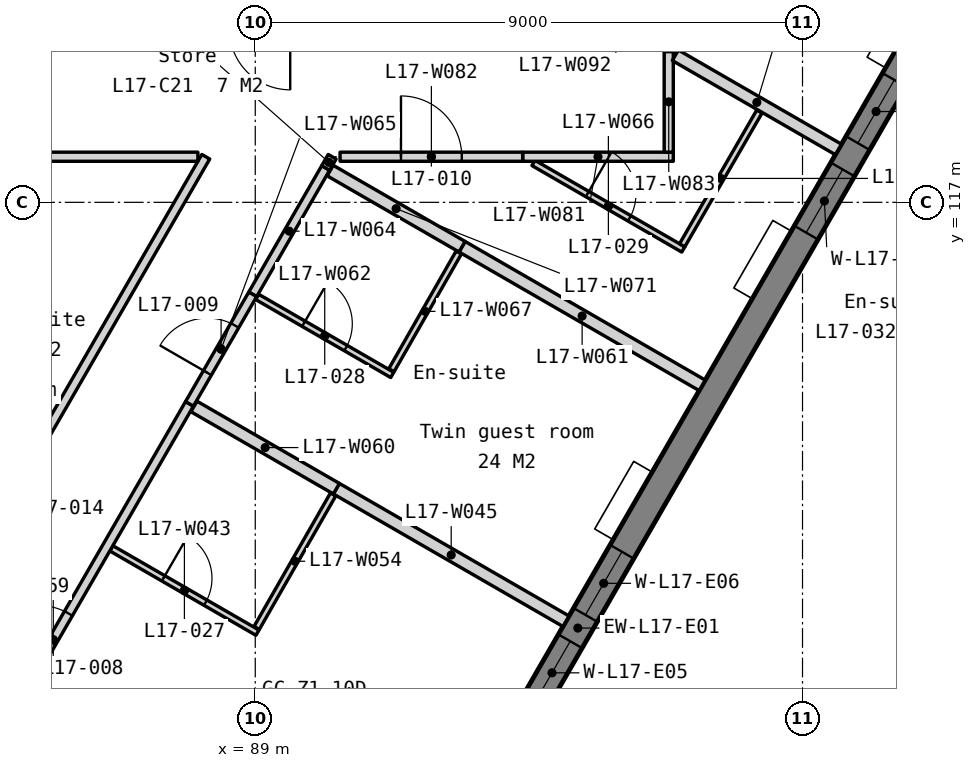
"""IFC4 building model, lengths in metres.
Left out: names, types, materials, properties, quantities, classifications, styles, units other than length and angle.
Written with IfcOpenShell. Run it as: python <this file> out.ifc"""

import sys

from ifc_helpers import new_model, si_unit, direction, frame, frame_2d, origin, place, context, subcontext, project, spatial, polyline, rectangle, outline, extrude, element, fill, save


model = new_model("IFC4")
c1 = context("Model", 3, precision=1e-05, world=origin(), true_north=direction((0.0, 1.0)))
c2 = subcontext(c1, "Body", "Model", "MODEL_VIEW")
j1 = project(units=[si_unit("LENGTHUNIT", "METRE"), si_unit("PLANEANGLEUNIT", "RADIAN")], contexts=[c1])
p1 = place(None, origin())
s1 = spatial("IfcSite", under=j1, at=p1, CompositionType="ELEMENT")
p2 = place(p1, origin())
s2 = spatial("IfcBuilding", under=s1, at=p2, CompositionType="ELEMENT")
p3 = place(p2, frame((0.0, 0.0, 73.5)))
s3 = spatial("IfcBuildingStorey", under=s2, at=p3, CompositionType="ELEMENT", Elevation=73.5)
p4 = place(p3, frame((83.105, 90.599, -0.15), z_axis=(0.0, 0.0, 1.0), x_axis=(0.499999201451, 0.866025864826, 0.0)))
e1 = element("IfcWall", 1, at=p4, inside=s3, PredefinedType="SOLIDWALL", context=c2, shape_type="SweptSolid", body=[
    extrude(outline(polyline([(44.8, 0.0), (44.8, 3.4), (0.0, 3.4), (0.0, 0.0), (44.8, 0.0)])), frame((0.0, 0.225, 0.0), z_axis=(0.0, -1.0, 0.0), x_axis=(1.0, 0.0, 0.0)), (0.0, 0.0, 1.0), 0.45),
])
p5 = place(p4, frame((3.03, 0.0, 1.05)))
e2 = element("IfcOpeningElement", 2, at=p5, cuts=e1, PredefinedType="OPENING", context=c2, shape_type="SweptSolid", body=[
    extrude(rectangle(XDim=1.2, YDim=1.5, at=frame_2d((0.6, 0.75))), frame((0.0, 0.235, 0.0), z_axis=(0.0, -1.0, 0.0), x_axis=(1.0, 0.0, 0.0)), (0.0, 0.0, 1.0), 0.47),
])
p6 = place(p4, frame((4.73, 0.0, 1.05)))
e3 = element("IfcOpeningElement", 3, at=p6, cuts=e1, PredefinedType="OPENING", context=c2, shape_type="SweptSolid", body=[
    extrude(rectangle(XDim=1.2, YDim=1.5, at=frame_2d((0.6, 0.75))), frame((0.0, 0.235, 0.0), z_axis=(0.0, -1.0, 0.0), x_axis=(1.0, 0.0, 0.0)), (0.0, 0.0, 1.0), 0.47),
])
p7 = place(p4, frame((11.99, 0.0, 1.05)))
e4 = element("IfcOpeningElement", 4, at=p7, cuts=e1, PredefinedType="OPENING", context=c2, shape_type="SweptSolid", body=[
    extrude(rectangle(XDim=1.2, YDim=1.5, at=frame_2d((0.6, 0.75))), frame((0.0, 0.235, 0.0), z_axis=(0.0, -1.0, 0.0), x_axis=(1.0, 0.0, 0.0)), (0.0, 0.0, 1.0), 0.47),
])
p8 = place(p4, frame((13.69, 0.0, 1.05)))
e5 = element("IfcOpeningElement", 5, at=p8, cuts=e1, PredefinedType="OPENING", context=c2, shape_type="SweptSolid", body=[
    extrude(rectangle(XDim=1.2, YDim=1.5, at=frame_2d((0.6, 0.75))), frame((0.0, 0.235, 0.0), z_axis=(0.0, -1.0, 0.0), x_axis=(1.0, 0.0, 0.0)), (0.0, 0.0, 1.0), 0.47),
])
p9 = place(p4, frame((20.95, 0.0, 1.05)))
e6 = element("IfcOpeningElement", 6, at=p9, cuts=e1, PredefinedType="OPENING", context=c2, shape_type="SweptSolid", body=[
    extrude(rectangle(XDim=1.2, YDim=1.5, at=frame_2d((0.6, 0.75))), frame((0.0, 0.235, 0.0), z_axis=(0.0, -1.0, 0.0), x_axis=(1.0, 0.0, 0.0)), (0.0, 0.0, 1.0), 0.47),
])
p10 = place(p4, frame((22.65, 0.0, 1.05)))
e7 = element("IfcOpeningElement", 7, at=p10, cuts=e1, PredefinedType="OPENING", context=c2, shape_type="SweptSolid", body=[
    extrude(rectangle(XDim=1.2, YDim=1.5, at=frame_2d((0.6, 0.75))), frame((0.0, 0.235, 0.0), z_axis=(0.0, -1.0, 0.0), x_axis=(1.0, 0.0, 0.0)), (0.0, 0.0, 1.0), 0.47),
])
p11 = place(p4, frame((29.91, 0.0, 1.05)))
e8 = element("IfcOpeningElement", 8, at=p11, cuts=e1, PredefinedType="OPENING", context=c2, shape_type="SweptSolid", body=[
    extrude(rectangle(XDim=1.2, YDim=1.5, at=frame_2d((0.6, 0.75))), frame((0.0, 0.235, 0.0), z_axis=(0.0, -1.0, 0.0), x_axis=(1.0, 0.0, 0.0)), (0.0, 0.0, 1.0), 0.47),
])
p12 = place(p4, frame((31.61, 0.0, 1.05)))
e9 = element("IfcOpeningElement", 9, at=p12, cuts=e1, PredefinedType="OPENING", context=c2, shape_type="SweptSolid", body=[
    extrude(rectangle(XDim=1.2, YDim=1.5, at=frame_2d((0.6, 0.75))), frame((0.0, 0.235, 0.0), z_axis=(0.0, -1.0, 0.0), x_axis=(1.0, 0.0, 0.0)), (0.0, 0.0, 1.0), 0.47),
])
p13 = place(p4, frame((38.87, 0.0, 1.05)))
e10 = element("IfcOpeningElement", 10, at=p13, cuts=e1, PredefinedType="OPENING", context=c2, shape_type="SweptSolid", body=[
    extrude(rectangle(XDim=1.2, YDim=1.5, at=frame_2d((0.6, 0.75))), frame((0.0, 0.235, 0.0), z_axis=(0.0, -1.0, 0.0), x_axis=(1.0, 0.0, 0.0)), (0.0, 0.0, 1.0), 0.47),
])
p14 = place(p4, frame((40.57, 0.0, 1.05)))
e11 = element("IfcOpeningElement", 11, at=p14, cuts=e1, PredefinedType="OPENING", context=c2, shape_type="SweptSolid", body=[
    extrude(rectangle(XDim=1.2, YDim=1.5, at=frame_2d((0.6, 0.75))), frame((0.0, 0.235, 0.0), z_axis=(0.0, -1.0, 0.0), x_axis=(1.0, 0.0, 0.0)), (0.0, 0.0, 1.0), 0.47),
])
p15 = place(p3, frame((81.502, 106.172, 0.0), z_axis=(0.0, 0.0, 1.0), x_axis=(0.500004357924, 0.866022887721, 0.0)))
e12 = element("IfcWall", 12, at=p15, inside=s3, PredefinedType="PARTITIONING", context=c2, shape_type="SweptSolid", body=[
    extrude(rectangle(XDim=13.369, YDim=0.15, at=frame_2d((6.685, 0.0))), origin(), (0.0, 0.0, 1.0), 3.25),
])
p16 = place(p15, frame((6.235, 0.0, 0.0)))
e13 = element("IfcOpeningElement", 13, at=p16, cuts=e12, PredefinedType="OPENING", context=c2, shape_type="SweptSolid", body=[
    extrude(rectangle(XDim=0.9, YDim=2.1, at=frame_2d((0.45, 1.05))), frame((0.0, 0.085, 0.0), z_axis=(0.0, -1.0, 0.0), x_axis=(1.0, 0.0, 0.0)), (0.0, 0.0, 1.0), 0.17),
])
p17 = place(p3, frame((86.633, 111.31, 0.0), z_axis=(0.0, 0.0, 1.0), x_axis=(0.86600392025, -0.500037208726, 0.0)))
e14 = element("IfcWall", 14, at=p17, inside=s3, PredefinedType="PARTITIONING", context=c2, shape_type="SweptSolid", body=[
    extrude(rectangle(XDim=2.775, YDim=0.1, at=frame_2d((1.388, 0.0))), origin(), (0.0, 0.0, 1.0), 3.25),
])
p18 = place(p17, frame((0.988, 0.0, 0.0)))
e15 = element("IfcOpeningElement", 15, at=p18, cuts=e14, PredefinedType="OPENING", context=c2, shape_type="SweptSolid", body=[
    extrude(rectangle(XDim=0.8, YDim=2.1, at=frame_2d((0.4, 1.05))), frame((0.0, 0.06, 0.0), z_axis=(0.0, -1.0, 0.0), x_axis=(1.0, 0.0, 0.0)), (0.0, 0.0, 1.0), 0.12),
])
p19 = place(p3, frame((90.334, 112.29, 0.0), z_axis=(0.0, 0.0, 1.0), x_axis=(0.866032659912, -0.499987431809, 0.0)))
e16 = element("IfcWall", 16, at=p19, inside=s3, PredefinedType="PARTITIONING", context=c2, shape_type="SweptSolid", body=[
    extrude(rectangle(XDim=4.36, YDim=0.2, at=frame_2d((2.18, 0.0))), origin(), (0.0, 0.0, 1.0), 3.25),
])
p20 = place(p3, frame((89.023, 109.999, 0.0), z_axis=(0.0, 0.0, 1.0), x_axis=(0.496762324189, 0.867886624661, 0.0)))
e17 = element("IfcWall", 17, at=p20, inside=s3, PredefinedType="PARTITIONING", context=c2, shape_type="SweptSolid", body=[
    extrude(rectangle(XDim=2.53, YDim=0.1, at=frame_2d((1.265, 0.0))), origin(), (0.0, 0.0, 1.0), 3.25),
])
p21 = place(p3, frame((83.438, 105.926, 0.0), z_axis=(0.0, 0.0, 1.0), x_axis=(0.500001561196, 0.866024502425, 0.0)))
e18 = element("IfcWall", 18, at=p21, inside=s3, PredefinedType="PARTITIONING", context=c2, shape_type="SweptSolid", body=[
    extrude(rectangle(XDim=8.96, YDim=0.15, at=frame_2d((4.48, 0.0))), origin(), (0.0, 0.0, 1.0), 3.25),
])
p22 = place(p21, frame((3.98, 0.0, 0.0)))
e19 = element("IfcOpeningElement", 19, at=p22, cuts=e18, PredefinedType="OPENING", context=c2, shape_type="SweptSolid", body=[
    extrude(rectangle(XDim=1.0, YDim=2.1, at=frame_2d((0.5, 1.05))), frame((0.0, 0.085, 0.0), z_axis=(0.0, -1.0, 0.0), x_axis=(1.0, 0.0, 0.0)), (0.0, 0.0, 1.0), 0.17),
])
p23 = place(p3, frame((87.992, 113.643, 0.0), z_axis=(0.0, 0.0, 1.0), x_axis=(0.866035297817, -0.499982862641, 0.0)))
e20 = element("IfcWall", 20, at=p23, inside=s3, PredefinedType="PARTITIONING", context=c2, shape_type="SweptSolid", body=[
    extrude(rectangle(XDim=2.705, YDim=0.2, at=frame_2d((1.353, 0.0))), origin(), (0.0, 0.0, 1.0), 3.25),
])
p24 = place(p3, frame((92.401, 116.27, 0.0), z_axis=(0.0, 0.0, 1.0), x_axis=(0.866030456496, -0.499991248344, 0.0)))
e21 = element("IfcWall", 21, at=p24, inside=s3, PredefinedType="PARTITIONING", context=c2, shape_type="SweptSolid", body=[
    extrude(rectangle(XDim=4.56, YDim=0.2, at=frame_2d((2.28, 0.0))), origin(), (0.0, 0.0, 1.0), 3.25),
])
p25 = place(p3, frame((89.032, 115.444, 0.0), z_axis=(0.0, 0.0, 1.0), x_axis=(0.866038183914, -0.499977863513, 0.0)))
e22 = element("IfcWall", 22, at=p25, inside=s3, PredefinedType="PARTITIONING", context=c2, shape_type="SweptSolid", body=[
    extrude(rectangle(XDim=2.565, YDim=0.1, at=frame_2d((1.282, 0.0))), origin(), (0.0, 0.0, 1.0), 3.25),
])
p26 = place(p25, frame((0.883, 0.0, 0.0)))
e23 = element("IfcOpeningElement", 23, at=p26, cuts=e22, PredefinedType="OPENING", context=c2, shape_type="SweptSolid", body=[
    extrude(rectangle(XDim=0.8, YDim=2.1, at=frame_2d((0.4, 1.05))), frame((0.0, 0.06, 0.0), z_axis=(0.0, -1.0, 0.0), x_axis=(1.0, 0.0, 0.0)), (0.0, 0.0, 1.0), 0.12),
])
p27 = place(p3, frame((88.958, 115.487, 0.0), z_axis=(0.0, 0.0, 1.0), x_axis=(0.500001309137, 0.866024647952, 0.0)))
e24 = element("IfcWall", 24, at=p27, inside=s3, PredefinedType="PARTITIONING", context=c2, shape_type="SweptSolid", body=[
    extrude(rectangle(XDim=2.4, YDim=0.15, at=frame_2d((1.2, 0.0))), origin(), (0.0, 0.0, 1.0), 3.25),
])
p28 = place(p3, frame((87.918, 113.685, 0.0), z_axis=(0.0, 0.0, 1.0), x_axis=(0.500027264788, 0.866009661879, 0.0)))
e25 = element("IfcWall", 25, at=p28, inside=s3, PredefinedType="PARTITIONING", context=c2, shape_type="SweptSolid", body=[
    extrude(rectangle(XDim=2.08, YDim=0.15, at=frame_2d((1.04, 0.0))), origin(), (0.0, 0.0, 1.0), 3.25),
])
p29 = place(p28, frame((0.59, 0.0, 0.0)))
e26 = element("IfcOpeningElement", 26, at=p29, cuts=e25, PredefinedType="OPENING", context=c2, shape_type="SweptSolid", body=[
    extrude(rectangle(XDim=0.9, YDim=2.1, at=frame_2d((0.45, 1.05))), frame((0.0, 0.085, 0.0), z_axis=(0.0, -1.0, 0.0), x_axis=(1.0, 0.0, 0.0)), (0.0, 0.0, 1.0), 0.17),
])
p30 = place(p3, frame((93.575, 117.647, 0.0), z_axis=(0.0, 0.0, 1.0), x_axis=(0.866048401274, -0.499960165064, 0.0)))
e27 = element("IfcWall", 27, at=p30, inside=s3, PredefinedType="PARTITIONING", context=c2, shape_type="SweptSolid", body=[
    extrude(rectangle(XDim=2.845, YDim=0.1, at=frame_2d((1.422, 0.0))), origin(), (0.0, 0.0, 1.0), 3.25),
])
p31 = place(p30, frame((1.022, 0.0, 0.0)))
e28 = element("IfcOpeningElement", 28, at=p31, cuts=e27, PredefinedType="OPENING", context=c2, shape_type="SweptSolid", body=[
    extrude(rectangle(XDim=0.8, YDim=2.1, at=frame_2d((0.4, 1.05))), frame((0.0, 0.06, 0.0), z_axis=(0.0, -1.0, 0.0), x_axis=(1.0, 0.0, 0.0)), (0.0, 0.0, 1.0), 0.12),
])
p32 = place(p3, frame((91.24, 114.239, 0.0), z_axis=(0.0, 0.0, 1.0), x_axis=(0.496398307955, 0.868094879526, 0.0)))
e29 = element("IfcWall", 29, at=p32, inside=s3, PredefinedType="PARTITIONING", context=c2, shape_type="SweptSolid", body=[
    extrude(rectangle(XDim=2.23, YDim=0.1, at=frame_2d((1.115, 0.0))), origin(), (0.0, 0.0, 1.0), 3.25),
])
p33 = place(p3, frame((90.232, 117.522, 0.0), z_axis=(0.0, 0.0, 1.0), x_axis=(0.866015153657, -0.500017753321, 0.0)))
e30 = element("IfcWall", 30, at=p33, inside=s3, PredefinedType="PARTITIONING", context=c2, shape_type="SweptSolid", body=[
    extrude(rectangle(XDim=2.505, YDim=0.2, at=frame_2d((1.252, 0.0))), origin(), (0.0, 0.0, 1.0), 3.25),
])
p34 = place(p3, frame((81.502, 117.75, 0.0), z_axis=(0.0, 0.0, 1.0), x_axis=(1.0, 0.0, 0.0)))
e31 = element("IfcWall", 31, at=p34, inside=s3, PredefinedType="PARTITIONING", context=c2, shape_type="SweptSolid", body=[
    extrude(rectangle(XDim=6.555, YDim=0.15, at=frame_2d((3.277, 0.0))), origin(), (0.0, 0.0, 1.0), 3.25),
])
p35 = place(p3, frame((90.158, 117.565, 0.0), z_axis=(0.0, 0.0, 1.0), x_axis=(0.499458580617, 0.866337766837, 0.0)))
e32 = element("IfcWall", 32, at=p35, inside=s3, PredefinedType="PARTITIONING", context=c2, shape_type="SweptSolid", body=[
    extrude(rectangle(XDim=0.214, YDim=0.15, at=frame_2d((0.107, 0.0))), origin(), (0.0, 0.0, 1.0), 3.25),
])
p36 = place(p3, frame((93.398, 117.75, 0.0), z_axis=(0.0, 0.0, 1.0), x_axis=(1.0, 0.0, 0.0)))
e33 = element("IfcWall", 33, at=p36, inside=s3, PredefinedType="PARTITIONING", context=c2, shape_type="SweptSolid", body=[
    extrude(rectangle(XDim=2.477, YDim=0.15, at=frame_2d((1.239, 0.0))), origin(), (0.0, 0.0, 1.0), 3.25),
])
p37 = place(p3, frame((90.395, 117.75, 0.0), z_axis=(0.0, 0.0, 1.0), x_axis=(1.0, 0.0, 0.0)))
e34 = element("IfcWall", 34, at=p37, inside=s3, PredefinedType="PARTITIONING", context=c2, shape_type="SweptSolid", body=[
    extrude(rectangle(XDim=3.003, YDim=0.15, at=frame_2d((1.501, 0.0))), origin(), (0.0, 0.0, 1.0), 3.25),
])
p38 = place(p37, frame((1.001, 0.0, 0.0)))
e35 = element("IfcOpeningElement", 35, at=p38, cuts=e34, PredefinedType="OPENING", context=c2, shape_type="SweptSolid", body=[
    extrude(rectangle(XDim=1.0, YDim=2.1, at=frame_2d((0.5, 1.05))), frame((0.0, 0.085, 0.0), z_axis=(0.0, -1.0, 0.0), x_axis=(1.0, 0.0, 0.0)), (0.0, 0.0, 1.0), 0.17),
])
p39 = place(p3, frame((95.8, 117.825, 0.0), z_axis=(0.0, 0.0, 1.0), x_axis=(0.0, 1.0, 0.0)))
e36 = element("IfcWall", 36, at=p39, inside=s3, PredefinedType="PARTITIONING", context=c2, shape_type="SweptSolid", body=[
    extrude(rectangle(XDim=1.656, YDim=0.15, at=frame_2d((0.828, 0.0))), origin(), (0.0, 0.0, 1.0), 3.25),
])
p40 = place(p3, frame((95.908, 119.418, 0.0), z_axis=(0.0, 0.0, 1.0), x_axis=(0.866051688794, -0.499954470265, 0.0)))
e37 = element("IfcWall", 37, at=p40, inside=s3, PredefinedType="PARTITIONING", context=c2, shape_type="SweptSolid", body=[
    extrude(rectangle(XDim=3.097, YDim=0.2, at=frame_2d((1.548, 0.0))), origin(), (0.0, 0.0, 1.0), 3.25),
])
p41 = place(p3, frame((96.021, 116.293, 0.0), z_axis=(0.0, 0.0, 1.0), x_axis=(0.500005339912, 0.866022320763, 0.0)))
e38 = element("IfcWall", 38, at=p41, inside=s3, PredefinedType="PARTITIONING", context=c2, shape_type="SweptSolid", body=[
    extrude(rectangle(XDim=2.54, YDim=0.1, at=frame_2d((1.27, 0.0))), origin(), (0.0, 0.0, 1.0), 3.25),
])
p42 = place(p9, origin())
e39 = element("IfcWindow", 39, at=p42, inside=s3, PartitioningType="SINGLE_PANEL", PredefinedType="WINDOW", context=c2, shape_type="SweptSolid", body=[
    extrude(rectangle(XDim=1.2, YDim=1.5, at=frame_2d((0.6, 0.75))), frame((0.0, 0.03, 0.0), z_axis=(0.0, -1.0, 0.0), x_axis=(1.0, 0.0, 0.0)), (0.0, 0.0, 1.0), 0.06),
])
fill(e6, e39)
p43 = place(p10, origin())
e40 = element("IfcWindow", 40, at=p43, inside=s3, PartitioningType="SINGLE_PANEL", PredefinedType="WINDOW", context=c2, shape_type="SweptSolid", body=[
    extrude(rectangle(XDim=1.2, YDim=1.5, at=frame_2d((0.6, 0.75))), frame((0.0, 0.03, 0.0), z_axis=(0.0, -1.0, 0.0), x_axis=(1.0, 0.0, 0.0)), (0.0, 0.0, 1.0), 0.06),
])
fill(e7, e40)
p44 = place(p11, origin())
e41 = element("IfcWindow", 41, at=p44, inside=s3, PartitioningType="SINGLE_PANEL", PredefinedType="WINDOW", context=c2, shape_type="SweptSolid", body=[
    extrude(rectangle(XDim=1.2, YDim=1.5, at=frame_2d((0.6, 0.75))), frame((0.0, 0.03, 0.0), z_axis=(0.0, -1.0, 0.0), x_axis=(1.0, 0.0, 0.0)), (0.0, 0.0, 1.0), 0.06),
])
fill(e8, e41)
p45 = place(p12, origin())
e42 = element("IfcWindow", 42, at=p45, inside=s3, PartitioningType="SINGLE_PANEL", PredefinedType="WINDOW", context=c2, shape_type="SweptSolid", body=[
    extrude(rectangle(XDim=1.2, YDim=1.5, at=frame_2d((0.6, 0.75))), frame((0.0, 0.03, 0.0), z_axis=(0.0, -1.0, 0.0), x_axis=(1.0, 0.0, 0.0)), (0.0, 0.0, 1.0), 0.06),
])
fill(e9, e42)
p46 = place(p22, origin())
e43 = element("IfcDoor", 43, at=p46, inside=s3, OperationType="SINGLE_SWING_LEFT", PredefinedType="DOOR", context=c2, shape_type="SweptSolid", body=[
    extrude(rectangle(XDim=1.0, YDim=2.1, at=frame_2d((0.5, 1.05))), frame((0.0, 0.025, 0.0), z_axis=(0.0, -1.0, 0.0), x_axis=(1.0, 0.0, 0.0)), (0.0, 0.0, 1.0), 0.05),
])
fill(e19, e43)
p47 = place(p29, origin())
e44 = element("IfcDoor", 44, at=p47, inside=s3, OperationType="SINGLE_SWING_LEFT", PredefinedType="DOOR", context=c2, shape_type="SweptSolid", body=[
    extrude(rectangle(XDim=0.9, YDim=2.1, at=frame_2d((0.45, 1.05))), frame((0.0, 0.025, 0.0), z_axis=(0.0, -1.0, 0.0), x_axis=(1.0, 0.0, 0.0)), (0.0, 0.0, 1.0), 0.05),
])
fill(e26, e44)
p48 = place(p38, origin())
e45 = element("IfcDoor", 45, at=p48, inside=s3, OperationType="SINGLE_SWING_LEFT", PredefinedType="DOOR", context=c2, shape_type="SweptSolid", body=[
    extrude(rectangle(XDim=1.0, YDim=2.1, at=frame_2d((0.5, 1.05))), frame((0.0, 0.025, 0.0), z_axis=(0.0, -1.0, 0.0), x_axis=(1.0, 0.0, 0.0)), (0.0, 0.0, 1.0), 0.05),
])
fill(e35, e45)
p49 = place(p18, origin())
e46 = element("IfcDoor", 46, at=p49, inside=s3, OperationType="SINGLE_SWING_LEFT", PredefinedType="DOOR", context=c2, shape_type="SweptSolid", body=[
    extrude(rectangle(XDim=0.8, YDim=2.1, at=frame_2d((0.4, 1.05))), frame((0.0, 0.025, 0.0), z_axis=(0.0, -1.0, 0.0), x_axis=(1.0, 0.0, 0.0)), (0.0, 0.0, 1.0), 0.05),
])
fill(e15, e46)
p50 = place(p26, origin())
e47 = element("IfcDoor", 47, at=p50, inside=s3, OperationType="SINGLE_SWING_LEFT", PredefinedType="DOOR", context=c2, shape_type="SweptSolid", body=[
    extrude(rectangle(XDim=0.8, YDim=2.1, at=frame_2d((0.4, 1.05))), frame((0.0, 0.025, 0.0), z_axis=(0.0, -1.0, 0.0), x_axis=(1.0, 0.0, 0.0)), (0.0, 0.0, 1.0), 0.05),
])
fill(e23, e47)
p51 = place(p31, origin())
e48 = element("IfcDoor", 48, at=p51, inside=s3, OperationType="SINGLE_SWING_LEFT", PredefinedType="DOOR", context=c2, shape_type="SweptSolid", body=[
    extrude(rectangle(XDim=0.8, YDim=2.1, at=frame_2d((0.4, 1.05))), frame((0.0, 0.025, 0.0), z_axis=(0.0, -1.0, 0.0), x_axis=(1.0, 0.0, 0.0)), (0.0, 0.0, 1.0), 0.05),
])
fill(e28, e48)
save(model, sys.argv[1])
